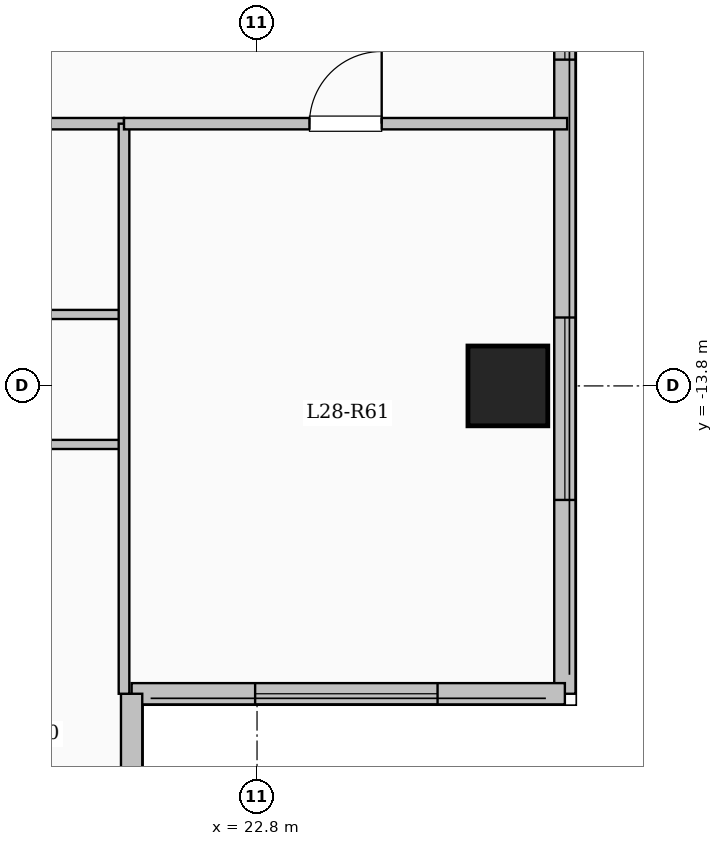
"""IFC4 building model, lengths in metres.
Left out: names, types, materials, properties, quantities, classifications, styles, units other than length and angle.
Written with IfcOpenShell. Run it as: python <this file> out.ifc"""

import sys

from ifc_helpers import new_model, si_unit, direction, frame, frame_2d, origin, origin_2d, place, context, subcontext, project, spatial, rectangle, extrude, element, fill, save


model = new_model("IFC4")
c1 = context("Model", 3, precision=1e-05, world=origin(), true_north=direction((0.0, 1.0)))
c2 = subcontext(c1, "Body", "Model", "MODEL_VIEW")
j1 = project(units=[si_unit("LENGTHUNIT", "METRE"), si_unit("PLANEANGLEUNIT", "RADIAN")], contexts=[c1])
p1 = place(None, origin())
s1 = spatial("IfcSite", under=j1, at=p1, CompositionType="ELEMENT")
p2 = place(p1, origin())
s2 = spatial("IfcBuilding", under=s1, at=p2, CompositionType="ELEMENT")
p3 = place(p2, frame((0.0, 0.0, 105.1)))
s3 = spatial("IfcBuildingStorey", under=s2, at=p3, CompositionType="ELEMENT", Elevation=105.1)
p4 = place(p3, frame((26.1, -13.8, 0.0), z_axis=(0.0, 0.0, 1.0), x_axis=(1.0, 0.0, 0.0)))
e1 = element("IfcColumn", 1, at=p4, inside=s3, PredefinedType="COLUMN", context=c2, shape_type="SweptSolid", body=[
    extrude(rectangle(XDim=1.05, YDim=1.05, at=origin_2d()), origin(), (0.0, 0.0, 1.0), 3.35),
])
p5 = place(p3, frame((26.85, 17.85, 0.0), z_axis=(0.0, 0.0, 1.0), x_axis=(0.0, -1.0, 0.0)))
e2 = element("IfcWall", 2, at=p5, inside=s3, PredefinedType="SOLIDWALL", context=c2, shape_type="SweptSolid", body=[
    extrude(rectangle(XDim=35.7, YDim=0.28, at=frame_2d((17.85, 0.0))), origin(), (0.0, 0.0, 1.0), 3.1),
])
p6 = place(p5, frame((1.675, 0.0, 0.9)))
e3 = element("IfcOpeningElement", 3, at=p6, cuts=e2, PredefinedType="OPENING", context=c2, shape_type="SweptSolid", body=[
    extrude(rectangle(XDim=2.0, YDim=1.7, at=frame_2d((1.0, 0.85))), frame((0.0, 0.15, 0.0), z_axis=(0.0, -1.0, 0.0), x_axis=(1.0, 0.0, 0.0)), (0.0, 0.0, 1.0), 0.3),
])
p7 = place(p5, frame((5.725, 0.0, 0.95)))
e4 = element("IfcOpeningElement", 4, at=p7, cuts=e2, PredefinedType="OPENING", context=c2, shape_type="SweptSolid", body=[
    extrude(rectangle(XDim=1.0, YDim=1.5, at=frame_2d((0.5, 0.75))), frame((0.0, 0.15, 0.0), z_axis=(0.0, -1.0, 0.0), x_axis=(1.0, 0.0, 0.0)), (0.0, 0.0, 1.0), 0.3),
])
p8 = place(p5, frame((8.975, 0.0, 0.9)))
e5 = element("IfcOpeningElement", 5, at=p8, cuts=e2, PredefinedType="OPENING", context=c2, shape_type="SweptSolid", body=[
    extrude(rectangle(XDim=2.0, YDim=1.7, at=frame_2d((1.0, 0.85))), frame((0.0, 0.15, 0.0), z_axis=(0.0, -1.0, 0.0), x_axis=(1.0, 0.0, 0.0)), (0.0, 0.0, 1.0), 0.3),
])
p9 = place(p5, frame((13.725, 0.0, 0.9)))
e6 = element("IfcOpeningElement", 6, at=p9, cuts=e2, PredefinedType="OPENING", context=c2, shape_type="SweptSolid", body=[
    extrude(rectangle(XDim=1.8, YDim=1.65, at=frame_2d((0.9, 0.825))), frame((0.0, 0.15, 0.0), z_axis=(0.0, -1.0, 0.0), x_axis=(1.0, 0.0, 0.0)), (0.0, 0.0, 1.0), 0.3),
])
p10 = place(p5, frame((19.55, 0.0, 0.9)))
e7 = element("IfcOpeningElement", 7, at=p10, cuts=e2, PredefinedType="OPENING", context=c2, shape_type="SweptSolid", body=[
    extrude(rectangle(XDim=2.4, YDim=1.8, at=frame_2d((1.2, 0.9))), frame((0.0, 0.15, 0.0), z_axis=(0.0, -1.0, 0.0), x_axis=(1.0, 0.0, 0.0)), (0.0, 0.0, 1.0), 0.3),
])
p11 = place(p5, frame((25.857, 0.0, 0.9)))
e8 = element("IfcOpeningElement", 8, at=p11, cuts=e2, PredefinedType="OPENING", context=c2, shape_type="SweptSolid", body=[
    extrude(rectangle(XDim=1.5, YDim=1.65, at=frame_2d((0.75, 0.825))), frame((0.0, 0.15, 0.0), z_axis=(0.0, -1.0, 0.0), x_axis=(1.0, 0.0, 0.0)), (0.0, 0.0, 1.0), 0.3),
])
p12 = place(p5, frame((30.75, 0.0, 0.9)))
e9 = element("IfcOpeningElement", 9, at=p12, cuts=e2, PredefinedType="OPENING", context=c2, shape_type="SweptSolid", body=[
    extrude(rectangle(XDim=2.4, YDim=1.8, at=frame_2d((1.2, 0.9))), frame((0.0, 0.15, 0.0), z_axis=(0.0, -1.0, 0.0), x_axis=(1.0, 0.0, 0.0)), (0.0, 0.0, 1.0), 0.3),
])
p13 = place(p3, frame((26.85, -17.85, 0.0), z_axis=(0.0, 0.0, 1.0), x_axis=(-1.0, 0.0, 0.0)))
e10 = element("IfcWall", 10, at=p13, inside=s3, PredefinedType="SOLIDWALL", context=c2, shape_type="SweptSolid", body=[
    extrude(rectangle(XDim=5.7, YDim=0.28, at=frame_2d((2.85, 0.0))), origin(), (0.0, 0.0, 1.0), 3.1),
])
p14 = place(p13, frame((1.675, 0.0, 0.9)))
e11 = element("IfcOpeningElement", 11, at=p14, cuts=e10, PredefinedType="OPENING", context=c2, shape_type="SweptSolid", body=[
    extrude(rectangle(XDim=2.4, YDim=1.8, at=frame_2d((1.2, 0.9))), frame((0.0, 0.15, 0.0), z_axis=(0.0, -1.0, 0.0), x_axis=(1.0, 0.0, 0.0)), (0.0, 0.0, 1.0), 0.3),
])
p15 = place(p3, frame((21.15, -17.85, 0.0), z_axis=(0.0, 0.0, 1.0), x_axis=(0.0, -1.0, 0.0)))
e12 = element("IfcWall", 12, at=p15, inside=s3, PredefinedType="SOLIDWALL", context=c2, shape_type="SweptSolid", body=[
    extrude(rectangle(XDim=4.2, YDim=0.28, at=frame_2d((2.1, 0.0))), origin(), (0.0, 0.0, 1.0), 3.1),
])
p16 = place(p15, frame((1.182, 0.0, 0.9)))
e13 = element("IfcOpeningElement", 13, at=p16, cuts=e12, PredefinedType="OPENING", context=c2, shape_type="SweptSolid", body=[
    extrude(rectangle(XDim=1.8, YDim=1.65, at=frame_2d((0.9, 0.825))), frame((0.0, 0.15, 0.0), z_axis=(0.0, -1.0, 0.0), x_axis=(1.0, 0.0, 0.0)), (0.0, 0.0, 1.0), 0.3),
])
p17 = place(p3, frame((8.55, -10.35, 0.0), z_axis=(0.0, 0.0, 1.0), x_axis=(1.0, 0.0, 0.0)))
e14 = element("IfcWall", 14, at=p17, inside=s3, PredefinedType="PARTITIONING", context=c2, shape_type="SweptSolid", body=[
    extrude(rectangle(XDim=12.5, YDim=0.15, at=frame_2d((6.25, 0.0))), origin(), (0.0, 0.0, 1.0), 3.1),
])
p18 = place(p17, frame((0.75, 0.0, 0.0)))
e15 = element("IfcOpeningElement", 15, at=p18, cuts=e14, PredefinedType="OPENING", context=c2, shape_type="SweptSolid", body=[
    extrude(rectangle(XDim=0.96, YDim=2.15, at=frame_2d((0.48, 1.075))), frame((0.0, 0.085, 0.0), z_axis=(0.0, -1.0, 0.0), x_axis=(1.0, 0.0, 0.0)), (0.0, 0.0, 1.0), 0.17),
])
p19 = place(p3, frame((17.165, -12.86, 0.0), z_axis=(0.0, 0.0, 1.0), x_axis=(1.0, 0.0, 0.0)))
e16 = element("IfcWall", 16, at=p19, inside=s3, PredefinedType="PARTITIONING", context=c2, shape_type="SweptSolid", body=[
    extrude(rectangle(XDim=3.885, YDim=0.12, at=frame_2d((1.942, 0.0))), origin(), (0.0, 0.0, 1.0), 3.1),
])
p20 = place(p19, frame((1.503, 0.0, 0.0)))
e17 = element("IfcOpeningElement", 17, at=p20, cuts=e16, PredefinedType="OPENING", context=c2, shape_type="SweptSolid", body=[
    extrude(rectangle(XDim=0.88, YDim=2.1, at=frame_2d((0.44, 1.05))), frame((0.0, 0.07, 0.0), z_axis=(0.0, -1.0, 0.0), x_axis=(1.0, 0.0, 0.0)), (0.0, 0.0, 1.0), 0.14),
])
p21 = place(p3, frame((12.792, -14.57, 0.0), z_axis=(0.0, 0.0, 1.0), x_axis=(1.0, 0.0, 0.0)))
e18 = element("IfcWall", 18, at=p21, inside=s3, PredefinedType="PARTITIONING", context=c2, shape_type="SweptSolid", body=[
    extrude(rectangle(XDim=8.318, YDim=0.12, at=frame_2d((4.159, 0.0))), origin(), (0.0, 0.0, 1.0), 2.635),
])
p22 = place(p21, frame((0.916, 0.0, 0.0)))
e19 = element("IfcOpeningElement", 19, at=p22, cuts=e18, PredefinedType="OPENING", context=c2, shape_type="SweptSolid", body=[
    extrude(rectangle(XDim=0.88, YDim=2.1, at=frame_2d((0.44, 1.05))), frame((0.0, 0.07, 0.0), z_axis=(0.0, -1.0, 0.0), x_axis=(1.0, 0.0, 0.0)), (0.0, 0.0, 1.0), 0.14),
])
p23 = place(p21, frame((3.629, 0.0, 0.0)))
e20 = element("IfcOpeningElement", 20, at=p23, cuts=e18, PredefinedType="OPENING", context=c2, shape_type="SweptSolid", body=[
    extrude(rectangle(XDim=0.88, YDim=2.1, at=frame_2d((0.44, 1.05))), frame((0.0, 0.07, 0.0), z_axis=(0.0, -1.0, 0.0), x_axis=(1.0, 0.0, 0.0)), (0.0, 0.0, 1.0), 0.14),
])
p24 = place(p21, frame((6.342, 0.0, 0.0)))
e21 = element("IfcOpeningElement", 21, at=p24, cuts=e18, PredefinedType="OPENING", context=c2, shape_type="SweptSolid", body=[
    extrude(rectangle(XDim=0.88, YDim=2.1, at=frame_2d((0.44, 1.05))), frame((0.0, 0.07, 0.0), z_axis=(0.0, -1.0, 0.0), x_axis=(1.0, 0.0, 0.0)), (0.0, 0.0, 1.0), 0.14),
])
p25 = place(p3, frame((21.05, -17.85, 0.0), z_axis=(0.0, 0.0, 1.0), x_axis=(0.0, 1.0, 0.0)))
e22 = element("IfcWall", 22, at=p25, inside=s3, PredefinedType="PARTITIONING", context=c2, shape_type="SweptSolid", body=[
    extrude(rectangle(XDim=7.5, YDim=0.14, at=frame_2d((3.75, 0.0))), origin(), (0.0, 0.0, 1.0), 3.1),
])
p26 = place(p3, frame((21.05, -10.35, 0.0), z_axis=(0.0, 0.0, 1.0), x_axis=(1.0, 0.0, 0.0)))
e23 = element("IfcWall", 23, at=p26, inside=s3, PredefinedType="PARTITIONING", context=c2, shape_type="SweptSolid", body=[
    extrude(rectangle(XDim=5.83, YDim=0.15, at=frame_2d((2.915, 0.0))), origin(), (0.0, 0.0, 1.0), 3.1),
])
p27 = place(p26, frame((2.44, 0.0, 0.0)))
e24 = element("IfcOpeningElement", 24, at=p27, cuts=e23, PredefinedType="OPENING", context=c2, shape_type="SweptSolid", body=[
    extrude(rectangle(XDim=0.95, YDim=2.15, at=frame_2d((0.475, 1.075))), frame((0.0, 0.085, 0.0), z_axis=(0.0, -1.0, 0.0), x_axis=(1.0, 0.0, 0.0)), (0.0, 0.0, 1.0), 0.17),
])
p28 = place(p11, origin())
e25 = element("IfcWindow", 25, at=p28, inside=s3, PartitioningType="SINGLE_PANEL", PredefinedType="WINDOW", context=c2, shape_type="SweptSolid", body=[
    extrude(rectangle(XDim=1.5, YDim=1.65, at=frame_2d((0.75, 0.825))), frame((0.0, 0.03, 0.0), z_axis=(0.0, -1.0, 0.0), x_axis=(1.0, 0.0, 0.0)), (0.0, 0.0, 1.0), 0.06),
])
fill(e8, e25)
p29 = place(p12, origin())
e26 = element("IfcWindow", 26, at=p29, inside=s3, PartitioningType="SINGLE_PANEL", PredefinedType="WINDOW", context=c2, shape_type="SweptSolid", body=[
    extrude(rectangle(XDim=2.4, YDim=1.8, at=frame_2d((1.2, 0.9))), frame((0.0, 0.03, 0.0), z_axis=(0.0, -1.0, 0.0), x_axis=(1.0, 0.0, 0.0)), (0.0, 0.0, 1.0), 0.06),
])
fill(e9, e26)
p30 = place(p14, origin())
e27 = element("IfcWindow", 27, at=p30, inside=s3, PartitioningType="SINGLE_PANEL", PredefinedType="WINDOW", context=c2, shape_type="SweptSolid", body=[
    extrude(rectangle(XDim=2.4, YDim=1.8, at=frame_2d((1.2, 0.9))), frame((0.0, 0.03, 0.0), z_axis=(0.0, -1.0, 0.0), x_axis=(1.0, 0.0, 0.0)), (0.0, 0.0, 1.0), 0.06),
])
fill(e11, e27)
p31 = place(p27, origin())
e28 = element("IfcDoor", 28, at=p31, inside=s3, OperationType="SINGLE_SWING_RIGHT", PredefinedType="DOOR", context=c2, shape_type="SweptSolid", body=[
    extrude(rectangle(XDim=0.95, YDim=2.15, at=frame_2d((0.475, 1.075))), frame((0.0, 0.025, 0.0), z_axis=(0.0, -1.0, 0.0), x_axis=(1.0, 0.0, 0.0)), (0.0, 0.0, 1.0), 0.05),
])
fill(e24, e28)
save(model, sys.argv[1])
